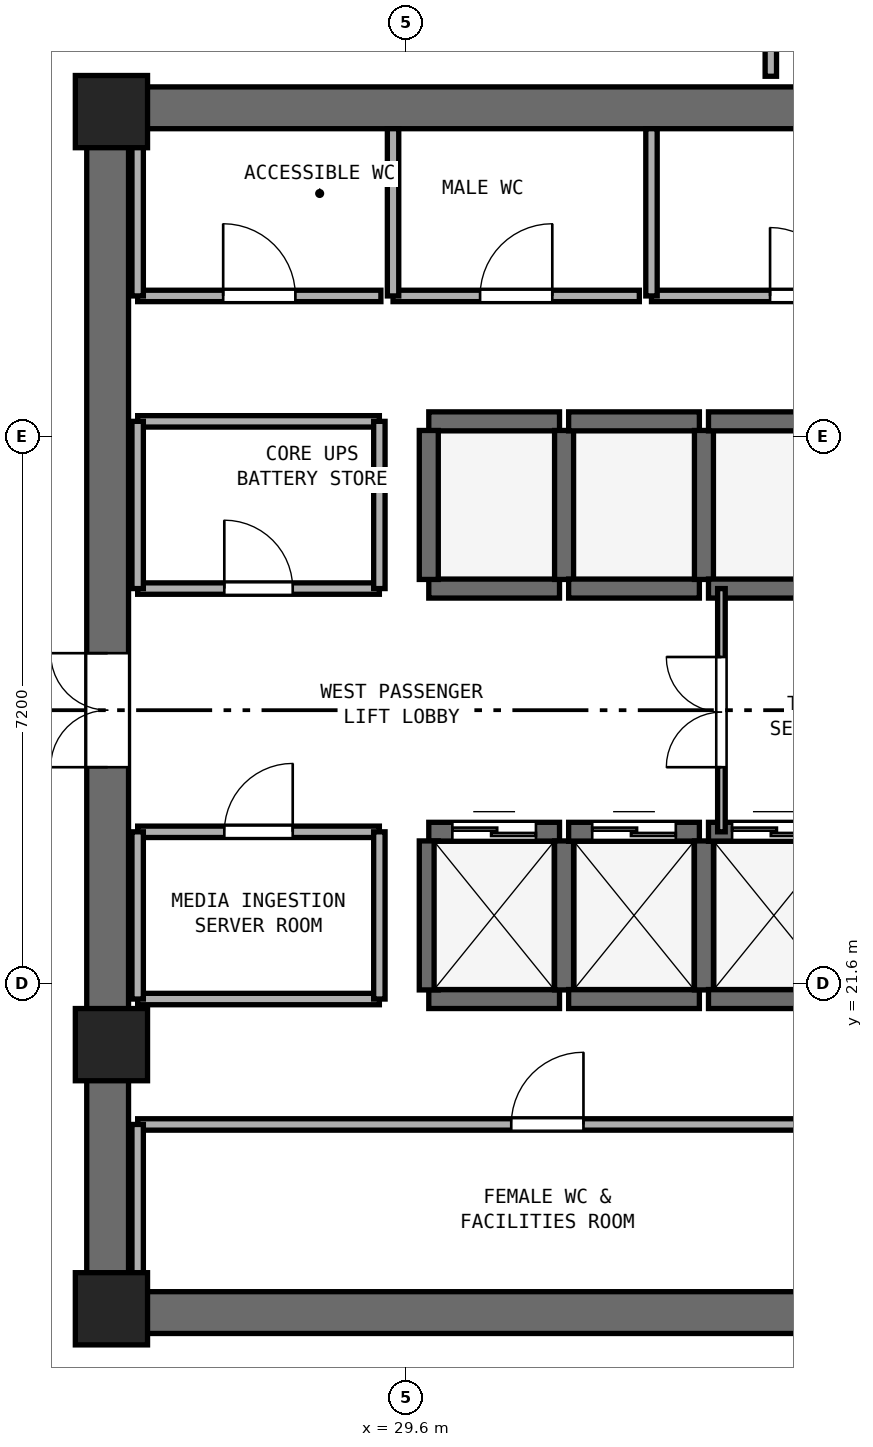
"""IFC4 building model, lengths in metres.
Left out: names, types, materials, properties, quantities, classifications, styles, units other than length and angle.
Written with IfcOpenShell. Run it as: python <this file> out.ifc"""

import sys

from ifc_helpers import new_model, si_unit, direction, frame, frame_2d, origin, origin_2d, place, context, subcontext, project, spatial, rectangle, extrude, element, fill, save


model = new_model("IFC4")
c1 = context("Model", 3, precision=1e-05, world=origin(), true_north=direction((0.0, 1.0)))
c2 = subcontext(c1, "Body", "Model", "MODEL_VIEW")
j1 = project(units=[si_unit("LENGTHUNIT", "METRE"), si_unit("PLANEANGLEUNIT", "RADIAN")], contexts=[c1])
p1 = place(None, origin())
s1 = spatial("IfcSite", under=j1, at=p1, CompositionType="ELEMENT")
p2 = place(p1, origin())
s2 = spatial("IfcBuilding", under=s1, at=p2, CompositionType="ELEMENT")
p3 = place(p2, frame((0.0, 0.0, 151.6)))
s3 = spatial("IfcBuildingStorey", under=s2, at=p3, CompositionType="ELEMENT", Elevation=151.6)
for number, where, z_axis, x_axis in (
    (1, (25.4, 17.275, 0.0), (0.0, 0.0, 1.0), (1.0, 0.0, 0.0)),
    (2, (25.4, 33.125, 0.0), (0.0, 0.0, 1.0), (1.0, 0.0, 0.0)),
):
    element("IfcWall", number, at=place(p3, frame(where, z_axis=z_axis, x_axis=x_axis)), inside=s3, PredefinedType="SHEAR", context=c2, shape_type="SweptSolid", body=[
        extrude(rectangle(XDim=23.2, YDim=0.55, at=frame_2d((11.6, 0.0))), origin(), (0.0, 0.0, 1.0), 3.54),
    ])
p4 = place(p3, frame((25.675, 17.55, 0.0), z_axis=(0.0, 0.0, 1.0), x_axis=(0.0, 1.0, 0.0)))
e3 = element("IfcWall", 3, at=p4, inside=s3, PredefinedType="SHEAR", context=c2, shape_type="SweptSolid", body=[
    extrude(rectangle(XDim=15.3, YDim=0.55, at=frame_2d((7.65, 0.0))), origin(), (0.0, 0.0, 1.0), 3.54),
])
p5 = place(p4, frame((6.9, 0.0, 0.0)))
e4 = element("IfcOpeningElement", 4, at=p5, cuts=e3, PredefinedType="OPENING", context=c2, shape_type="SweptSolid", body=[
    extrude(rectangle(XDim=1.5, YDim=2.15, at=frame_2d((0.75, 1.075))), frame((0.0, 0.285, 0.0), z_axis=(0.0, -1.0, 0.0), x_axis=(1.0, 0.0, 0.0)), (0.0, 0.0, 1.0), 0.57),
])
for number, where, z_axis, x_axis in (
    (5, (25.725, 17.325, 0.0), (0.0, 0.0, 1.0), (1.0, 0.0, 0.0)),
    (6, (25.725, 33.075, 0.0), (0.0, 0.0, 1.0), (1.0, 0.0, 0.0)),
    (7, (25.725, 20.8, 0.0), (0.0, 0.0, 1.0), (1.0, 0.0, 0.0)),
):
    element("IfcColumn", number, at=place(p3, frame(where, z_axis=z_axis, x_axis=x_axis)), inside=s3, PredefinedType="PILASTER", context=c2, shape_type="SweptSolid", body=[
        extrude(rectangle(XDim=0.95, YDim=0.95, at=origin_2d()), origin(), (0.0, 0.0, 1.0), 3.8),
    ])
p6 = place(p3, frame((29.9, 21.4, 0.0), z_axis=(0.0, 0.0, 1.0), x_axis=(1.0, 0.0, 0.0)))
e8 = element("IfcWall", 8, at=p6, inside=s3, PredefinedType="SHEAR", context=c2, shape_type="SweptSolid", body=[
    extrude(rectangle(XDim=1.72, YDim=0.25, at=frame_2d((0.86, 0.0))), origin(), (0.0, 0.0, 1.0), 3.54),
])
p7 = place(p3, frame((29.9, 23.6, 0.0), z_axis=(0.0, 0.0, 1.0), x_axis=(1.0, 0.0, 0.0)))
e9 = element("IfcWall", 9, at=p7, inside=s3, PredefinedType="SHEAR", context=c2, shape_type="SweptSolid", body=[
    extrude(rectangle(XDim=1.72, YDim=0.25, at=frame_2d((0.86, 0.0))), origin(), (0.0, 0.0, 1.0), 3.54),
])
p8 = place(p7, frame((0.31, 0.0, 0.0)))
e10 = element("IfcOpeningElement", 10, at=p8, cuts=e9, PredefinedType="OPENING", context=c2, shape_type="SweptSolid", body=[
    extrude(rectangle(XDim=1.1, YDim=2.15, at=frame_2d((0.55, 1.075))), frame((0.0, 0.135, 0.0), z_axis=(0.0, -1.0, 0.0), x_axis=(1.0, 0.0, 0.0)), (0.0, 0.0, 1.0), 0.27),
])
for number, where, z_axis, x_axis in (
    (11, (29.9, 21.52, 0.0), (0.0, 0.0, 1.0), (0.0, 1.0, 0.0)),
    (12, (31.68, 21.52, 0.0), (0.0, 0.0, 1.0), (0.0, 1.0, 0.0)),
):
    element("IfcWall", number, at=place(p3, frame(where, z_axis=z_axis, x_axis=x_axis)), inside=s3, PredefinedType="SHEAR", context=c2, shape_type="SweptSolid", body=[
        extrude(rectangle(XDim=1.96, YDim=0.25, at=frame_2d((0.98, 0.0))), origin(), (0.0, 0.0, 1.0), 3.54),
    ])
p9 = place(p3, frame((31.74, 21.4, 0.0), z_axis=(0.0, 0.0, 1.0), x_axis=(1.0, 0.0, 0.0)))
e13 = element("IfcWall", 13, at=p9, inside=s3, PredefinedType="SHEAR", context=c2, shape_type="SweptSolid", body=[
    extrude(rectangle(XDim=1.72, YDim=0.25, at=frame_2d((0.86, 0.0))), origin(), (0.0, 0.0, 1.0), 3.54),
])
p10 = place(p3, frame((31.74, 23.6, 0.0), z_axis=(0.0, 0.0, 1.0), x_axis=(1.0, 0.0, 0.0)))
e14 = element("IfcWall", 14, at=p10, inside=s3, PredefinedType="SHEAR", context=c2, shape_type="SweptSolid", body=[
    extrude(rectangle(XDim=1.72, YDim=0.25, at=frame_2d((0.86, 0.0))), origin(), (0.0, 0.0, 1.0), 3.54),
])
p11 = place(p10, frame((0.31, 0.0, 0.0)))
e15 = element("IfcOpeningElement", 15, at=p11, cuts=e14, PredefinedType="OPENING", context=c2, shape_type="SweptSolid", body=[
    extrude(rectangle(XDim=1.1, YDim=2.15, at=frame_2d((0.55, 1.075))), frame((0.0, 0.135, 0.0), z_axis=(0.0, -1.0, 0.0), x_axis=(1.0, 0.0, 0.0)), (0.0, 0.0, 1.0), 0.27),
])
p12 = place(p3, frame((33.52, 21.52, 0.0), z_axis=(0.0, 0.0, 1.0), x_axis=(0.0, 1.0, 0.0)))
e16 = element("IfcWall", 16, at=p12, inside=s3, PredefinedType="SHEAR", context=c2, shape_type="SweptSolid", body=[
    extrude(rectangle(XDim=1.96, YDim=0.25, at=frame_2d((0.98, 0.0))), origin(), (0.0, 0.0, 1.0), 3.54),
])
p13 = place(p3, frame((33.58, 21.4, 0.0), z_axis=(0.0, 0.0, 1.0), x_axis=(1.0, 0.0, 0.0)))
e17 = element("IfcWall", 17, at=p13, inside=s3, PredefinedType="SHEAR", context=c2, shape_type="SweptSolid", body=[
    extrude(rectangle(XDim=1.72, YDim=0.25, at=frame_2d((0.86, 0.0))), origin(), (0.0, 0.0, 1.0), 3.54),
])
p14 = place(p3, frame((33.58, 23.6, 0.0), z_axis=(0.0, 0.0, 1.0), x_axis=(1.0, 0.0, 0.0)))
e18 = element("IfcWall", 18, at=p14, inside=s3, PredefinedType="SHEAR", context=c2, shape_type="SweptSolid", body=[
    extrude(rectangle(XDim=1.72, YDim=0.25, at=frame_2d((0.86, 0.0))), origin(), (0.0, 0.0, 1.0), 3.54),
])
p15 = place(p14, frame((0.31, 0.0, 0.0)))
e19 = element("IfcOpeningElement", 19, at=p15, cuts=e18, PredefinedType="OPENING", context=c2, shape_type="SweptSolid", body=[
    extrude(rectangle(XDim=1.1, YDim=2.15, at=frame_2d((0.55, 1.075))), frame((0.0, 0.135, 0.0), z_axis=(0.0, -1.0, 0.0), x_axis=(1.0, 0.0, 0.0)), (0.0, 0.0, 1.0), 0.27),
])
for number, where, z_axis, x_axis in (
    (20, (29.9, 26.8, 0.0), (0.0, 0.0, 1.0), (1.0, 0.0, 0.0)),
    (21, (29.9, 29.0, 0.0), (0.0, 0.0, 1.0), (1.0, 0.0, 0.0)),
):
    element("IfcWall", number, at=place(p3, frame(where, z_axis=z_axis, x_axis=x_axis)), inside=s3, PredefinedType="SHEAR", context=c2, shape_type="SweptSolid", body=[
        extrude(rectangle(XDim=1.72, YDim=0.25, at=frame_2d((0.86, 0.0))), origin(), (0.0, 0.0, 1.0), 3.54),
    ])
for number, where, z_axis, x_axis in (
    (22, (29.9, 26.92, 0.0), (0.0, 0.0, 1.0), (0.0, 1.0, 0.0)),
    (23, (31.68, 26.92, 0.0), (0.0, 0.0, 1.0), (0.0, 1.0, 0.0)),
):
    element("IfcWall", number, at=place(p3, frame(where, z_axis=z_axis, x_axis=x_axis)), inside=s3, PredefinedType="SHEAR", context=c2, shape_type="SweptSolid", body=[
        extrude(rectangle(XDim=1.96, YDim=0.25, at=frame_2d((0.98, 0.0))), origin(), (0.0, 0.0, 1.0), 3.54),
    ])
for number, where, z_axis, x_axis in (
    (24, (31.74, 26.8, 0.0), (0.0, 0.0, 1.0), (1.0, 0.0, 0.0)),
    (25, (31.74, 29.0, 0.0), (0.0, 0.0, 1.0), (1.0, 0.0, 0.0)),
):
    element("IfcWall", number, at=place(p3, frame(where, z_axis=z_axis, x_axis=x_axis)), inside=s3, PredefinedType="SHEAR", context=c2, shape_type="SweptSolid", body=[
        extrude(rectangle(XDim=1.72, YDim=0.25, at=frame_2d((0.86, 0.0))), origin(), (0.0, 0.0, 1.0), 3.54),
    ])
p16 = place(p3, frame((33.52, 26.92, 0.0), z_axis=(0.0, 0.0, 1.0), x_axis=(0.0, 1.0, 0.0)))
e26 = element("IfcWall", 26, at=p16, inside=s3, PredefinedType="SHEAR", context=c2, shape_type="SweptSolid", body=[
    extrude(rectangle(XDim=1.96, YDim=0.25, at=frame_2d((0.98, 0.0))), origin(), (0.0, 0.0, 1.0), 3.54),
])
for number, where, z_axis, x_axis in (
    (27, (33.58, 26.8, 0.0), (0.0, 0.0, 1.0), (1.0, 0.0, 0.0)),
    (28, (33.58, 29.0, 0.0), (0.0, 0.0, 1.0), (1.0, 0.0, 0.0)),
):
    element("IfcWall", number, at=place(p3, frame(where, z_axis=z_axis, x_axis=x_axis)), inside=s3, PredefinedType="SHEAR", context=c2, shape_type="SweptSolid", body=[
        extrude(rectangle(XDim=1.72, YDim=0.25, at=frame_2d((0.86, 0.0))), origin(), (0.0, 0.0, 1.0), 3.54),
    ])
p17 = place(p3, frame((26.07, 30.65, 0.0), z_axis=(0.0, 0.0, 1.0), x_axis=(1.0, 0.0, 0.0)))
e29 = element("IfcWall", 29, at=p17, inside=s3, PredefinedType="PARTITIONING", context=c2, shape_type="SweptSolid", body=[
    extrude(rectangle(XDim=3.2, YDim=0.15, at=frame_2d((1.6, 0.0))), origin(), (0.0, 0.0, 1.0), 3.54),
])
p18 = place(p17, frame((1.125, 0.0, 0.0)))
e30 = element("IfcOpeningElement", 30, at=p18, cuts=e29, PredefinedType="OPENING", context=c2, shape_type="SweptSolid", body=[
    extrude(rectangle(XDim=0.95, YDim=2.1, at=frame_2d((0.475, 1.05))), frame((0.0, 0.085, 0.0), z_axis=(0.0, -1.0, 0.0), x_axis=(1.0, 0.0, 0.0)), (0.0, 0.0, 1.0), 0.17),
])
p19 = place(p3, frame((26.07, 30.65, 0.0), z_axis=(0.0, 0.0, 1.0), x_axis=(0.0, 1.0, 0.0)))
e31 = element("IfcWall", 31, at=p19, inside=s3, PredefinedType="PARTITIONING", context=c2, shape_type="SweptSolid", body=[
    extrude(rectangle(XDim=2.2, YDim=0.15, at=frame_2d((1.1, 0.0))), origin(), (0.0, 0.0, 1.0), 2.64),
])
p20 = place(p3, frame((29.43, 30.65, 0.0), z_axis=(0.0, 0.0, 1.0), x_axis=(1.0, 0.0, 0.0)))
e32 = element("IfcWall", 32, at=p20, inside=s3, PredefinedType="PARTITIONING", context=c2, shape_type="SweptSolid", body=[
    extrude(rectangle(XDim=3.24, YDim=0.15, at=frame_2d((1.62, 0.0))), origin(), (0.0, 0.0, 1.0), 3.54),
])
p21 = place(p20, frame((1.145, 0.0, 0.0)))
e33 = element("IfcOpeningElement", 33, at=p21, cuts=e32, PredefinedType="OPENING", context=c2, shape_type="SweptSolid", body=[
    extrude(rectangle(XDim=0.95, YDim=2.1, at=frame_2d((0.475, 1.05))), frame((0.0, 0.085, 0.0), z_axis=(0.0, -1.0, 0.0), x_axis=(1.0, 0.0, 0.0)), (0.0, 0.0, 1.0), 0.17),
])
p22 = place(p3, frame((29.43, 30.65, 0.0), z_axis=(0.0, 0.0, 1.0), x_axis=(0.0, 1.0, 0.0)))
e34 = element("IfcWall", 34, at=p22, inside=s3, PredefinedType="PARTITIONING", context=c2, shape_type="SweptSolid", body=[
    extrude(rectangle(XDim=2.2, YDim=0.15, at=frame_2d((1.1, 0.0))), origin(), (0.0, 0.0, 1.0), 3.54),
])
p23 = place(p3, frame((32.83, 30.65, 0.0), z_axis=(0.0, 0.0, 1.0), x_axis=(1.0, 0.0, 0.0)))
e35 = element("IfcWall", 35, at=p23, inside=s3, PredefinedType="PARTITIONING", context=c2, shape_type="SweptSolid", body=[
    extrude(rectangle(XDim=4.02, YDim=0.15, at=frame_2d((2.01, 0.0))), origin(), (0.0, 0.0, 1.0), 3.54),
])
p24 = place(p23, frame((1.56, 0.0, 0.0)))
e36 = element("IfcOpeningElement", 36, at=p24, cuts=e35, PredefinedType="OPENING", context=c2, shape_type="SweptSolid", body=[
    extrude(rectangle(XDim=0.9, YDim=2.1, at=frame_2d((0.45, 1.05))), frame((0.0, 0.085, 0.0), z_axis=(0.0, -1.0, 0.0), x_axis=(1.0, 0.0, 0.0)), (0.0, 0.0, 1.0), 0.17),
])
p25 = place(p3, frame((32.83, 30.65, 0.0), z_axis=(0.0, 0.0, 1.0), x_axis=(0.0, 1.0, 0.0)))
e37 = element("IfcWall", 37, at=p25, inside=s3, PredefinedType="PARTITIONING", context=c2, shape_type="SweptSolid", body=[
    extrude(rectangle(XDim=2.2, YDim=0.15, at=frame_2d((1.1, 0.0))), origin(), (0.0, 0.0, 1.0), 3.54),
])
p26 = place(p3, frame((26.07, 19.75, 0.0), z_axis=(0.0, 0.0, 1.0), x_axis=(1.0, 0.0, 0.0)))
e38 = element("IfcWall", 38, at=p26, inside=s3, PredefinedType="PARTITIONING", context=c2, shape_type="SweptSolid", body=[
    extrude(rectangle(XDim=10.78, YDim=0.15, at=frame_2d((5.39, 0.0))), origin(), (0.0, 0.0, 1.0), 3.54),
])
p27 = place(p26, frame((4.915, 0.0, 0.0)))
e39 = element("IfcOpeningElement", 39, at=p27, cuts=e38, PredefinedType="OPENING", context=c2, shape_type="SweptSolid", body=[
    extrude(rectangle(XDim=0.95, YDim=2.1, at=frame_2d((0.475, 1.05))), frame((0.0, 0.085, 0.0), z_axis=(0.0, -1.0, 0.0), x_axis=(1.0, 0.0, 0.0)), (0.0, 0.0, 1.0), 0.17),
])
p28 = place(p3, frame((26.07, 17.55, 0.0), z_axis=(0.0, 0.0, 1.0), x_axis=(0.0, 1.0, 0.0)))
e40 = element("IfcWall", 40, at=p28, inside=s3, PredefinedType="PARTITIONING", context=c2, shape_type="SweptSolid", body=[
    extrude(rectangle(XDim=2.2, YDim=0.15, at=frame_2d((1.1, 0.0))), origin(), (0.0, 0.0, 1.0), 2.64),
])
p29 = place(p3, frame((26.07, 26.8, 0.0), z_axis=(0.0, 0.0, 1.0), x_axis=(1.0, 0.0, 0.0)))
e41 = element("IfcWall", 41, at=p29, inside=s3, PredefinedType="PARTITIONING", context=c2, shape_type="SweptSolid", body=[
    extrude(rectangle(XDim=3.18, YDim=0.15, at=frame_2d((1.59, 0.0))), origin(), (0.0, 0.0, 1.0), 3.54),
])
p30 = place(p29, frame((1.14, 0.0, 0.0)))
e42 = element("IfcOpeningElement", 42, at=p30, cuts=e41, PredefinedType="OPENING", context=c2, shape_type="SweptSolid", body=[
    extrude(rectangle(XDim=0.9, YDim=2.1, at=frame_2d((0.45, 1.05))), frame((0.0, 0.085, 0.0), z_axis=(0.0, -1.0, 0.0), x_axis=(1.0, 0.0, 0.0)), (0.0, 0.0, 1.0), 0.17),
])
p31 = place(p3, frame((26.07, 29.0, 0.0), z_axis=(0.0, 0.0, 1.0), x_axis=(1.0, 0.0, 0.0)))
e43 = element("IfcWall", 43, at=p31, inside=s3, PredefinedType="PARTITIONING", context=c2, shape_type="SweptSolid", body=[
    extrude(rectangle(XDim=3.18, YDim=0.15, at=frame_2d((1.59, 0.0))), origin(), (0.0, 0.0, 1.0), 3.54),
])
p32 = place(p3, frame((26.07, 26.8, 0.0), z_axis=(0.0, 0.0, 1.0), x_axis=(0.0, 1.0, 0.0)))
e44 = element("IfcWall", 44, at=p32, inside=s3, PredefinedType="PARTITIONING", context=c2, shape_type="SweptSolid", body=[
    extrude(rectangle(XDim=2.2, YDim=0.15, at=frame_2d((1.1, 0.0))), origin(), (0.0, 0.0, 1.0), 2.64),
])
p33 = place(p3, frame((29.25, 26.8, 0.0), z_axis=(0.0, 0.0, 1.0), x_axis=(0.0, 1.0, 0.0)))
e45 = element("IfcWall", 45, at=p33, inside=s3, PredefinedType="PARTITIONING", context=c2, shape_type="SweptSolid", body=[
    extrude(rectangle(XDim=2.2, YDim=0.15, at=frame_2d((1.1, 0.0))), origin(), (0.0, 0.0, 1.0), 3.54),
])
p34 = place(p3, frame((26.07, 21.4, 0.0), z_axis=(0.0, 0.0, 1.0), x_axis=(1.0, 0.0, 0.0)))
e46 = element("IfcWall", 46, at=p34, inside=s3, PredefinedType="PARTITIONING", context=c2, shape_type="SweptSolid", body=[
    extrude(rectangle(XDim=3.18, YDim=0.15, at=frame_2d((1.59, 0.0))), origin(), (0.0, 0.0, 1.0), 3.54),
])
p35 = place(p3, frame((26.07, 23.6, 0.0), z_axis=(0.0, 0.0, 1.0), x_axis=(1.0, 0.0, 0.0)))
e47 = element("IfcWall", 47, at=p35, inside=s3, PredefinedType="PARTITIONING", context=c2, shape_type="SweptSolid", body=[
    extrude(rectangle(XDim=3.18, YDim=0.15, at=frame_2d((1.59, 0.0))), origin(), (0.0, 0.0, 1.0), 3.54),
])
p36 = place(p35, frame((1.14, 0.0, 0.0)))
e48 = element("IfcOpeningElement", 48, at=p36, cuts=e47, PredefinedType="OPENING", context=c2, shape_type="SweptSolid", body=[
    extrude(rectangle(XDim=0.9, YDim=2.1, at=frame_2d((0.45, 1.05))), frame((0.0, 0.085, 0.0), z_axis=(0.0, -1.0, 0.0), x_axis=(1.0, 0.0, 0.0)), (0.0, 0.0, 1.0), 0.17),
])
p37 = place(p3, frame((26.07, 21.4, 0.0), z_axis=(0.0, 0.0, 1.0), x_axis=(0.0, 1.0, 0.0)))
e49 = element("IfcWall", 49, at=p37, inside=s3, PredefinedType="PARTITIONING", context=c2, shape_type="SweptSolid", body=[
    extrude(rectangle(XDim=2.2, YDim=0.15, at=frame_2d((1.1, 0.0))), origin(), (0.0, 0.0, 1.0), 2.64),
])
p38 = place(p3, frame((29.25, 21.4, 0.0), z_axis=(0.0, 0.0, 1.0), x_axis=(0.0, 1.0, 0.0)))
e50 = element("IfcWall", 50, at=p38, inside=s3, PredefinedType="PARTITIONING", context=c2, shape_type="SweptSolid", body=[
    extrude(rectangle(XDim=2.2, YDim=0.15, at=frame_2d((1.1, 0.0))), origin(), (0.0, 0.0, 1.0), 3.54),
])
p39 = place(p3, frame((33.75, 23.6, 0.0), z_axis=(0.0, 0.0, 1.0), x_axis=(0.0, 1.0, 0.0)))
e51 = element("IfcWall", 51, at=p39, inside=s3, PredefinedType="PARTITIONING", context=c2, shape_type="SweptSolid", body=[
    extrude(rectangle(XDim=3.2, YDim=0.1, at=frame_2d((1.6, 0.0))), origin(), (0.0, 0.0, 1.0), 3.54),
])
p40 = place(p39, frame((0.85, 0.0, 0.0)))
e52 = element("IfcOpeningElement", 52, at=p40, cuts=e51, PredefinedType="OPENING", context=c2, shape_type="SweptSolid", body=[
    extrude(rectangle(XDim=1.45, YDim=2.12, at=frame_2d((0.725, 1.06))), frame((0.0, 0.06, 0.0), z_axis=(0.0, -1.0, 0.0), x_axis=(1.0, 0.0, 0.0)), (0.0, 0.0, 1.0), 0.12),
])
p41 = place(p3, frame((34.4, 33.54, 0.0), z_axis=(0.0, 0.0, 1.0), x_axis=(0.0, 1.0, 0.0)))
e53 = element("IfcWall", 53, at=p41, inside=s3, PredefinedType="PARTITIONING", context=c2, shape_type="SweptSolid", body=[
    extrude(rectangle(XDim=1.81, YDim=0.15, at=frame_2d((0.905, 0.0))), origin(), (0.0, 0.0, 1.0), 3.54),
])
p42 = place(p8, origin())
e54 = element("IfcDoor", 54, at=p42, inside=s3, OperationType="DOUBLE_DOOR_SLIDING", PredefinedType="DOOR", context=c2, shape_type="SweptSolid", body=[
    extrude(rectangle(XDim=1.1, YDim=2.15, at=frame_2d((0.55, 1.075))), frame((0.0, 0.025, 0.0), z_axis=(0.0, -1.0, 0.0), x_axis=(1.0, 0.0, 0.0)), (0.0, 0.0, 1.0), 0.05),
])
fill(e10, e54)
p43 = place(p11, origin())
e55 = element("IfcDoor", 55, at=p43, inside=s3, OperationType="DOUBLE_DOOR_SLIDING", PredefinedType="DOOR", context=c2, shape_type="SweptSolid", body=[
    extrude(rectangle(XDim=1.1, YDim=2.15, at=frame_2d((0.55, 1.075))), frame((0.0, 0.025, 0.0), z_axis=(0.0, -1.0, 0.0), x_axis=(1.0, 0.0, 0.0)), (0.0, 0.0, 1.0), 0.05),
])
fill(e15, e55)
p44 = place(p15, origin())
e56 = element("IfcDoor", 56, at=p44, inside=s3, OperationType="DOUBLE_DOOR_SLIDING", PredefinedType="DOOR", context=c2, shape_type="SweptSolid", body=[
    extrude(rectangle(XDim=1.1, YDim=2.15, at=frame_2d((0.55, 1.075))), frame((0.0, 0.025, 0.0), z_axis=(0.0, -1.0, 0.0), x_axis=(1.0, 0.0, 0.0)), (0.0, 0.0, 1.0), 0.05),
])
fill(e19, e56)
p45 = place(p5, origin())
e57 = element("IfcDoor", 57, at=p45, inside=s3, OperationType="DOUBLE_DOOR_SINGLE_SWING", PredefinedType="DOOR", context=c2, shape_type="SweptSolid", body=[
    extrude(rectangle(XDim=1.5, YDim=2.15, at=frame_2d((0.75, 1.075))), frame((0.0, 0.025, 0.0), z_axis=(0.0, -1.0, 0.0), x_axis=(1.0, 0.0, 0.0)), (0.0, 0.0, 1.0), 0.05),
])
fill(e4, e57)
p46 = place(p18, origin())
e58 = element("IfcDoor", 58, at=p46, inside=s3, OperationType="SINGLE_SWING_LEFT", PredefinedType="DOOR", context=c2, shape_type="SweptSolid", body=[
    extrude(rectangle(XDim=0.95, YDim=2.1, at=frame_2d((0.475, 1.05))), frame((0.0, 0.025, 0.0), z_axis=(0.0, -1.0, 0.0), x_axis=(1.0, 0.0, 0.0)), (0.0, 0.0, 1.0), 0.05),
])
fill(e30, e58)
p47 = place(p21, origin())
e59 = element("IfcDoor", 59, at=p47, inside=s3, OperationType="SINGLE_SWING_RIGHT", PredefinedType="DOOR", context=c2, shape_type="SweptSolid", body=[
    extrude(rectangle(XDim=0.95, YDim=2.1, at=frame_2d((0.475, 1.05))), frame((0.0, 0.025, 0.0), z_axis=(0.0, -1.0, 0.0), x_axis=(1.0, 0.0, 0.0)), (0.0, 0.0, 1.0), 0.05),
])
fill(e33, e59)
p48 = place(p24, origin())
e60 = element("IfcDoor", 60, at=p48, inside=s3, OperationType="SINGLE_SWING_LEFT", PredefinedType="DOOR", context=c2, shape_type="SweptSolid", body=[
    extrude(rectangle(XDim=0.9, YDim=2.1, at=frame_2d((0.45, 1.05))), frame((0.0, 0.025, 0.0), z_axis=(0.0, -1.0, 0.0), x_axis=(1.0, 0.0, 0.0)), (0.0, 0.0, 1.0), 0.05),
])
fill(e36, e60)
p49 = place(p27, origin())
e61 = element("IfcDoor", 61, at=p49, inside=s3, OperationType="SINGLE_SWING_RIGHT", PredefinedType="DOOR", context=c2, shape_type="SweptSolid", body=[
    extrude(rectangle(XDim=0.95, YDim=2.1, at=frame_2d((0.475, 1.05))), frame((0.0, 0.025, 0.0), z_axis=(0.0, -1.0, 0.0), x_axis=(1.0, 0.0, 0.0)), (0.0, 0.0, 1.0), 0.05),
])
fill(e39, e61)
p50 = place(p30, origin())
e62 = element("IfcDoor", 62, at=p50, inside=s3, OperationType="SINGLE_SWING_LEFT", PredefinedType="DOOR", context=c2, shape_type="SweptSolid", body=[
    extrude(rectangle(XDim=0.9, YDim=2.1, at=frame_2d((0.45, 1.05))), frame((0.0, 0.025, 0.0), z_axis=(0.0, -1.0, 0.0), x_axis=(1.0, 0.0, 0.0)), (0.0, 0.0, 1.0), 0.05),
])
fill(e42, e62)
p51 = place(p36, origin())
e63 = element("IfcDoor", 63, at=p51, inside=s3, OperationType="SINGLE_SWING_RIGHT", PredefinedType="DOOR", context=c2, shape_type="SweptSolid", body=[
    extrude(rectangle(XDim=0.9, YDim=2.1, at=frame_2d((0.45, 1.05))), frame((0.0, 0.025, 0.0), z_axis=(0.0, -1.0, 0.0), x_axis=(1.0, 0.0, 0.0)), (0.0, 0.0, 1.0), 0.05),
])
fill(e48, e63)
p52 = place(p40, origin())
e64 = element("IfcDoor", 64, at=p52, inside=s3, OperationType="DOUBLE_DOOR_SINGLE_SWING", PredefinedType="DOOR", context=c2, shape_type="SweptSolid", body=[
    extrude(rectangle(XDim=1.45, YDim=2.12, at=frame_2d((0.725, 1.06))), frame((0.0, 0.025, 0.0), z_axis=(0.0, -1.0, 0.0), x_axis=(1.0, 0.0, 0.0)), (0.0, 0.0, 1.0), 0.05),
])
fill(e52, e64)
save(model, sys.argv[1])
